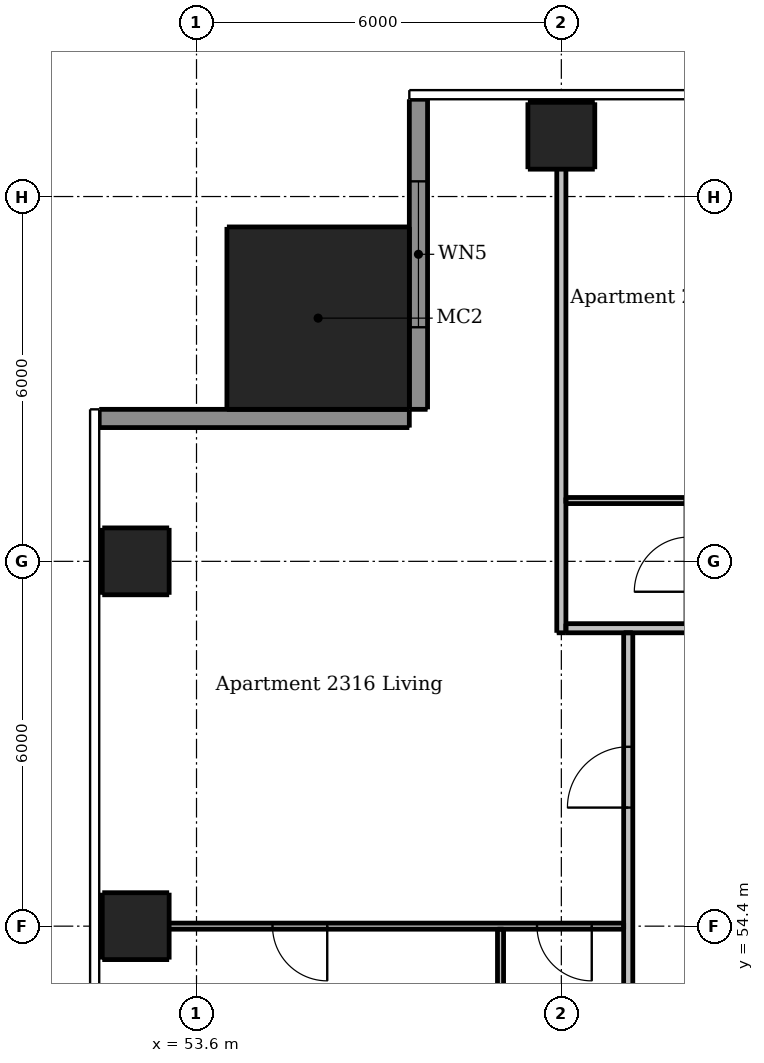
"""IFC4 building model, lengths in metres.
Left out: names, types, materials, properties, quantities, classifications, styles, units other than length and angle.
Written with IfcOpenShell. Run it as: python <this file> out.ifc"""

import sys

from ifc_helpers import new_model, si_unit, direction, frame, frame_2d, origin, origin_2d, place, context, subcontext, project, spatial, rectangle, extrude, element, fill, save


model = new_model("IFC4")
c1 = context("Model", 3, precision=1e-05, world=origin(), true_north=direction((0.0, 1.0)))
c2 = subcontext(c1, "Body", "Model", "MODEL_VIEW")
j1 = project(units=[si_unit("LENGTHUNIT", "METRE"), si_unit("PLANEANGLEUNIT", "RADIAN")], contexts=[c1])
p1 = place(None, origin())
s1 = spatial("IfcSite", under=j1, at=p1, CompositionType="ELEMENT")
p2 = place(p1, origin())
s2 = spatial("IfcBuilding", under=s1, at=p2, CompositionType="ELEMENT")
p3 = place(p2, frame((0.0, 0.0, 88.6)))
s3 = spatial("IfcBuildingStorey", under=s2, at=p3, CompositionType="ELEMENT", Elevation=88.6)
for number, where, z_axis, x_axis in (
    (1, (59.6, 67.4, 0.0), (0.0, 0.0, 1.0), (1.0, 0.0, 0.0)),
    (2, (52.6, 54.4, 0.0), (0.0, 0.0, 1.0), (1.0, 0.0, 0.0)),
    (3, (52.6, 60.4, 0.0), (0.0, 0.0, 1.0), (1.0, 0.0, 0.0)),
):
    element("IfcColumn", number, at=place(p3, frame(where, z_axis=z_axis, x_axis=x_axis)), inside=s3, PredefinedType="COLUMN", context=c2, shape_type="SweptSolid", body=[
        extrude(rectangle(XDim=1.1, YDim=1.1, at=origin_2d()), origin(), (0.0, 0.0, 1.0), 3.05),
    ])
p4 = place(p3, frame((55.6, 64.4, 0.0), z_axis=(0.0, 0.0, 1.0), x_axis=(1.0, 0.0, 0.0)))
e4 = element("IfcColumn", 4, at=p4, inside=s3, PredefinedType="COLUMN", context=c2, shape_type="SweptSolid", body=[
    extrude(rectangle(XDim=3.0, YDim=3.0, at=origin_2d()), origin(), (0.0, 0.0, 1.0), 3.3),
])
p5 = place(p3, frame((57.25, 68.0, 0.0), z_axis=(0.0, 0.0, 1.0), x_axis=(0.0, -1.0, 0.0)))
e5 = element("IfcWall", 5, at=p5, inside=s3, PredefinedType="SOLIDWALL", context=c2, shape_type="SweptSolid", body=[
    extrude(rectangle(XDim=5.1, YDim=0.3, at=frame_2d((2.55, 0.0))), origin(), (0.0, 0.0, 1.0), 3.05),
])
p6 = place(p5, frame((1.35, 0.0, 0.15)))
e6 = element("IfcOpeningElement", 6, at=p6, cuts=e5, PredefinedType="OPENING", context=c2, shape_type="SweptSolid", body=[
    extrude(rectangle(XDim=2.4, YDim=2.1, at=frame_2d((1.2, 1.05))), frame((0.0, 0.16, 0.0), z_axis=(0.0, -1.0, 0.0), x_axis=(1.0, 0.0, 0.0)), (0.0, 0.0, 1.0), 0.32),
])
p7 = place(p3, frame((57.1, 62.75, 0.0), z_axis=(0.0, 0.0, 1.0), x_axis=(-1.0, 0.0, 0.0)))
e7 = element("IfcWall", 7, at=p7, inside=s3, PredefinedType="SOLIDWALL", context=c2, shape_type="SweptSolid", body=[
    extrude(rectangle(XDim=5.1, YDim=0.3, at=frame_2d((2.55, 0.0))), origin(), (0.0, 0.0, 1.0), 3.05),
])
p8 = place(p3, frame((58.6, 54.35, 0.0), z_axis=(0.0, 0.0, 1.0), x_axis=(0.0, -1.0, 0.0)))
e8 = element("IfcWall", 8, at=p8, inside=s3, PredefinedType="PARTITIONING", context=c2, shape_type="SweptSolid", body=[
    extrude(rectangle(XDim=8.1, YDim=0.1, at=frame_2d((4.05, 0.0))), origin(), (0.0, 0.0, 1.0), 3.05),
])
p9 = place(p8, frame((3.75, 0.0, 0.0)))
e9 = element("IfcOpeningElement", 9, at=p9, cuts=e8, PredefinedType="OPENING", context=c2, shape_type="SweptSolid", body=[
    extrude(rectangle(XDim=0.8, YDim=2.1, at=frame_2d((0.4, 1.05))), frame((0.0, 0.06, 0.0), z_axis=(0.0, -1.0, 0.0), x_axis=(1.0, 0.0, 0.0)), (0.0, 0.0, 1.0), 0.12),
])
p10 = place(p3, frame((59.675, 61.4, 0.0), z_axis=(0.0, 0.0, 1.0), x_axis=(1.0, 0.0, 0.0)))
e10 = element("IfcWall", 10, at=p10, inside=s3, PredefinedType="PARTITIONING", context=c2, shape_type="SweptSolid", body=[
    extrude(rectangle(XDim=1.975, YDim=0.1, at=frame_2d((0.987, 0.0))), origin(), (0.0, 0.0, 1.0), 3.05),
])
p11 = place(p3, frame((60.625, 54.4, 0.0), z_axis=(0.0, 0.0, 1.0), x_axis=(-1.0, 0.0, 0.0)))
e11 = element("IfcWall", 11, at=p11, inside=s3, PredefinedType="PARTITIONING", context=c2, shape_type="SweptSolid", body=[
    extrude(rectangle(XDim=8.625, YDim=0.1, at=frame_2d((4.312, 0.0))), origin(), (0.0, 0.0, 1.0), 2.516),
])
p12 = place(p11, frame((0.525, 0.0, 0.0)))
e12 = element("IfcOpeningElement", 12, at=p12, cuts=e11, PredefinedType="OPENING", context=c2, shape_type="SweptSolid", body=[
    extrude(rectangle(XDim=0.9, YDim=2.1, at=frame_2d((0.45, 1.05))), frame((0.0, 0.06, 0.0), z_axis=(0.0, -1.0, 0.0), x_axis=(1.0, 0.0, 0.0)), (0.0, 0.0, 1.0), 0.12),
])
p13 = place(p11, frame((4.875, 0.0, 0.0)))
e13 = element("IfcOpeningElement", 13, at=p13, cuts=e11, PredefinedType="OPENING", context=c2, shape_type="SweptSolid", body=[
    extrude(rectangle(XDim=0.9, YDim=2.1, at=frame_2d((0.45, 1.05))), frame((0.0, 0.06, 0.0), z_axis=(0.0, -1.0, 0.0), x_axis=(1.0, 0.0, 0.0)), (0.0, 0.0, 1.0), 0.12),
])
p14 = place(p3, frame((59.6, 59.225, 0.0), z_axis=(0.0, 0.0, 1.0), x_axis=(0.0, 1.0, 0.0)))
e14 = element("IfcWall", 14, at=p14, inside=s3, PredefinedType="PARTITIONING", context=c2, shape_type="SweptSolid", body=[
    extrude(rectangle(XDim=8.775, YDim=0.15, at=frame_2d((4.387, 0.0))), origin(), (0.0, 0.0, 1.0), 2.51),
])
p15 = place(p3, frame((60.7, 30.325, 0.0), z_axis=(0.0, 0.0, 1.0), x_axis=(0.0, 1.0, 0.0)))
e15 = element("IfcWall", 15, at=p15, inside=s3, PredefinedType="PARTITIONING", context=c2, shape_type="SweptSolid", body=[
    extrude(rectangle(XDim=28.9, YDim=0.15, at=frame_2d((14.45, 0.0))), origin(), (0.0, 0.0, 1.0), 3.05),
])
p16 = place(p15, frame((2.575, 0.0, 0.0)))
e16 = element("IfcOpeningElement", 16, at=p16, cuts=e15, PredefinedType="OPENING", context=c2, shape_type="SweptSolid", body=[
    extrude(rectangle(XDim=1.0, YDim=2.1, at=frame_2d((0.5, 1.05))), frame((0.0, 0.085, 0.0), z_axis=(0.0, -1.0, 0.0), x_axis=(1.0, 0.0, 0.0)), (0.0, 0.0, 1.0), 0.17),
])
p17 = place(p15, frame((8.575, 0.0, 0.0)))
e17 = element("IfcOpeningElement", 17, at=p17, cuts=e15, PredefinedType="OPENING", context=c2, shape_type="SweptSolid", body=[
    extrude(rectangle(XDim=1.0, YDim=2.1, at=frame_2d((0.5, 1.05))), frame((0.0, 0.085, 0.0), z_axis=(0.0, -1.0, 0.0), x_axis=(1.0, 0.0, 0.0)), (0.0, 0.0, 1.0), 0.17),
])
p18 = place(p15, frame((14.575, 0.0, 0.0)))
e18 = element("IfcOpeningElement", 18, at=p18, cuts=e15, PredefinedType="OPENING", context=c2, shape_type="SweptSolid", body=[
    extrude(rectangle(XDim=1.0, YDim=2.1, at=frame_2d((0.5, 1.05))), frame((0.0, 0.085, 0.0), z_axis=(0.0, -1.0, 0.0), x_axis=(1.0, 0.0, 0.0)), (0.0, 0.0, 1.0), 0.17),
])
p19 = place(p15, frame((26.025, 0.0, 0.0)))
e19 = element("IfcOpeningElement", 19, at=p19, cuts=e15, PredefinedType="OPENING", context=c2, shape_type="SweptSolid", body=[
    extrude(rectangle(XDim=1.0, YDim=2.1, at=frame_2d((0.5, 1.05))), frame((0.0, 0.085, 0.0), z_axis=(0.0, -1.0, 0.0), x_axis=(1.0, 0.0, 0.0)), (0.0, 0.0, 1.0), 0.17),
])
p20 = place(p3, frame((59.675, 59.3, 0.0), z_axis=(0.0, 0.0, 1.0), x_axis=(1.0, 0.0, 0.0)))
e20 = element("IfcWall", 20, at=p20, inside=s3, PredefinedType="PARTITIONING", context=c2, shape_type="SweptSolid", body=[
    extrude(rectangle(XDim=28.55, YDim=0.15, at=frame_2d((14.275, 0.0))), origin(), (0.0, 0.0, 1.0), 3.05),
])
p21 = place(p20, frame((2.425, 0.0, 0.0)))
e21 = element("IfcOpeningElement", 21, at=p21, cuts=e20, PredefinedType="OPENING", context=c2, shape_type="SweptSolid", body=[
    extrude(rectangle(XDim=1.0, YDim=2.1, at=frame_2d((0.5, 1.05))), frame((0.0, 0.085, 0.0), z_axis=(0.0, -1.0, 0.0), x_axis=(1.0, 0.0, 0.0)), (0.0, 0.0, 1.0), 0.17),
])
p22 = place(p20, frame((8.425, 0.0, 0.0)))
e22 = element("IfcOpeningElement", 22, at=p22, cuts=e20, PredefinedType="OPENING", context=c2, shape_type="SweptSolid", body=[
    extrude(rectangle(XDim=1.0, YDim=2.1, at=frame_2d((0.5, 1.05))), frame((0.0, 0.085, 0.0), z_axis=(0.0, -1.0, 0.0), x_axis=(1.0, 0.0, 0.0)), (0.0, 0.0, 1.0), 0.17),
])
p23 = place(p20, frame((14.425, 0.0, 0.0)))
e23 = element("IfcOpeningElement", 23, at=p23, cuts=e20, PredefinedType="OPENING", context=c2, shape_type="SweptSolid", body=[
    extrude(rectangle(XDim=1.0, YDim=2.1, at=frame_2d((0.5, 1.05))), frame((0.0, 0.085, 0.0), z_axis=(0.0, -1.0, 0.0), x_axis=(1.0, 0.0, 0.0)), (0.0, 0.0, 1.0), 0.17),
])
p24 = place(p20, frame((25.775, 0.0, 0.0)))
e24 = element("IfcOpeningElement", 24, at=p24, cuts=e20, PredefinedType="OPENING", context=c2, shape_type="SweptSolid", body=[
    extrude(rectangle(XDim=1.0, YDim=2.1, at=frame_2d((0.5, 1.05))), frame((0.0, 0.085, 0.0), z_axis=(0.0, -1.0, 0.0), x_axis=(1.0, 0.0, 0.0)), (0.0, 0.0, 1.0), 0.17),
])
p25 = place(p6, origin())
e25 = element("IfcWindow", 25, at=p25, inside=s3, PartitioningType="DOUBLE_PANEL_VERTICAL", PredefinedType="WINDOW", context=c2, shape_type="SweptSolid", body=[
    extrude(rectangle(XDim=2.4, YDim=2.1, at=frame_2d((1.2, 1.05))), frame((0.0, 0.03, 0.0), z_axis=(0.0, -1.0, 0.0), x_axis=(1.0, 0.0, 0.0)), (0.0, 0.0, 1.0), 0.06),
])
fill(e6, e25)
p26 = place(p19, origin())
e26 = element("IfcDoor", 26, at=p26, inside=s3, OperationType="SINGLE_SWING_LEFT", PredefinedType="DOOR", context=c2, shape_type="SweptSolid", body=[
    extrude(rectangle(XDim=1.0, YDim=2.1, at=frame_2d((0.5, 1.05))), frame((0.0, 0.025, 0.0), z_axis=(0.0, -1.0, 0.0), x_axis=(1.0, 0.0, 0.0)), (0.0, 0.0, 1.0), 0.05),
])
fill(e19, e26)
p27 = place(p12, origin())
e27 = element("IfcDoor", 27, at=p27, inside=s3, OperationType="SINGLE_SWING_LEFT", PredefinedType="DOOR", context=c2, shape_type="SweptSolid", body=[
    extrude(rectangle(XDim=0.9, YDim=2.1, at=frame_2d((0.45, 1.05))), frame((0.0, 0.025, 0.0), z_axis=(0.0, -1.0, 0.0), x_axis=(1.0, 0.0, 0.0)), (0.0, 0.0, 1.0), 0.05),
])
fill(e12, e27)
p28 = place(p13, origin())
e28 = element("IfcDoor", 28, at=p28, inside=s3, OperationType="SINGLE_SWING_LEFT", PredefinedType="DOOR", context=c2, shape_type="SweptSolid", body=[
    extrude(rectangle(XDim=0.9, YDim=2.1, at=frame_2d((0.45, 1.05))), frame((0.0, 0.025, 0.0), z_axis=(0.0, -1.0, 0.0), x_axis=(1.0, 0.0, 0.0)), (0.0, 0.0, 1.0), 0.05),
])
fill(e13, e28)
save(model, sys.argv[1])
